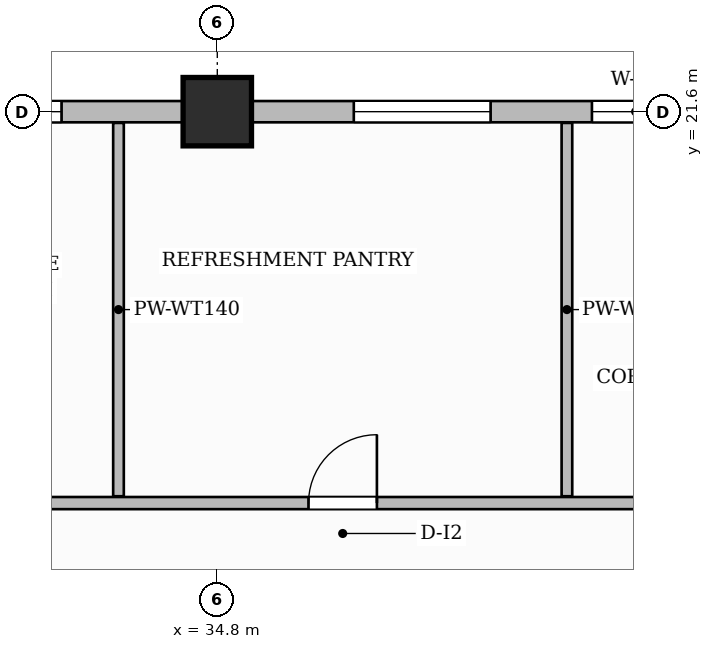
"""IFC4 building model, lengths in metres.
Left out: names, types, materials, properties, quantities, classifications, styles, units other than length and angle.
Written with IfcOpenShell. Run it as: python <this file> out.ifc"""

import sys

from ifc_helpers import new_model, si_unit, direction, frame, frame_2d, origin, origin_2d, place, context, subcontext, project, spatial, rectangle, extrude, source, transform, mapped, element, fill, save


model = new_model("IFC4")
c1 = context("Model", 3, precision=1e-05, world=origin(), true_north=direction((0.0, 1.0)))
c2 = subcontext(c1, "Body", "Model", "MODEL_VIEW")
j1 = project(units=[si_unit("LENGTHUNIT", "METRE"), si_unit("PLANEANGLEUNIT", "RADIAN")], contexts=[c1])
p1 = place(None, origin())
s1 = spatial("IfcSite", under=j1, at=p1, CompositionType="ELEMENT")
p2 = place(p1, origin())
s2 = spatial("IfcBuilding", under=s1, at=p2, CompositionType="ELEMENT")
p3 = place(p2, frame((0.0, 0.0, 213.45)))
s3 = spatial("IfcBuildingStorey", under=s2, at=p3, CompositionType="ELEMENT", Elevation=213.45)
m1 = source(origin(), c2, "Body", "SweptSolid", [
    extrude(rectangle(XDim=0.9, YDim=0.9, at=origin_2d()), origin(), (0.0, 0.0, 1.0), 3.85),
])
p4 = place(p3, frame((34.8, 21.6, 0.0), z_axis=(0.0, 0.0, 1.0), x_axis=(1.0, 0.0, 0.0)))
e1 = element("IfcColumn", 1, at=p4, inside=s3, PredefinedType="COLUMN", context=c2, shape_type="MappedRepresentation", body=[
    mapped(m1, transform((0.0, 0.0, 0.0), scale=1.0)),
])
p5 = place(p3, frame((30.29, 16.45, 0.0), z_axis=(0.0, 0.0, 1.0), x_axis=(1.0, 0.0, 0.0)))
e2 = element("IfcWall", 2, at=p5, inside=s3, PredefinedType="PARTITIONING", context=c2, shape_type="SweptSolid", body=[
    extrude(rectangle(XDim=19.37, YDim=0.16, at=frame_2d((9.685, 0.0))), origin(), (0.0, 0.0, 1.0), 3.6),
])
p6 = place(p5, frame((1.135, 0.0, 0.0)))
e3 = element("IfcOpeningElement", 3, at=p6, cuts=e2, PredefinedType="OPENING", context=c2, shape_type="SweptSolid", body=[
    extrude(rectangle(XDim=0.85, YDim=2.1, at=frame_2d((0.425, 1.05))), frame((0.0, 0.09, 0.0), z_axis=(0.0, -1.0, 0.0), x_axis=(1.0, 0.0, 0.0)), (0.0, 0.0, 1.0), 0.18),
])
p7 = place(p5, frame((5.71, 0.0, 0.0)))
e4 = element("IfcOpeningElement", 4, at=p7, cuts=e2, PredefinedType="OPENING", context=c2, shape_type="SweptSolid", body=[
    extrude(rectangle(XDim=0.9, YDim=2.15, at=frame_2d((0.45, 1.075))), frame((0.0, 0.09, 0.0), z_axis=(0.0, -1.0, 0.0), x_axis=(1.0, 0.0, 0.0)), (0.0, 0.0, 1.0), 0.18),
])
p8 = place(p5, frame((10.635, 0.0, 0.0)))
e5 = element("IfcOpeningElement", 5, at=p8, cuts=e2, PredefinedType="OPENING", context=c2, shape_type="SweptSolid", body=[
    extrude(rectangle(XDim=0.95, YDim=2.15, at=frame_2d((0.475, 1.075))), frame((0.0, 0.09, 0.0), z_axis=(0.0, -1.0, 0.0), x_axis=(1.0, 0.0, 0.0)), (0.0, 0.0, 1.0), 0.18),
])
p9 = place(p5, frame((16.235, 0.0, 0.0)))
e6 = element("IfcOpeningElement", 6, at=p9, cuts=e2, PredefinedType="OPENING", context=c2, shape_type="SweptSolid", body=[
    extrude(rectangle(XDim=0.95, YDim=2.15, at=frame_2d((0.475, 1.075))), frame((0.0, 0.09, 0.0), z_axis=(0.0, -1.0, 0.0), x_axis=(1.0, 0.0, 0.0)), (0.0, 0.0, 1.0), 0.18),
])
for number, where, z_axis, x_axis in (
    (7, (33.5, 16.54, 0.0), (0.0, 0.0, 1.0), (0.0, 1.0, 0.0)),
    (8, (39.4, 16.54, 0.0), (0.0, 0.0, 1.0), (0.0, 1.0, 0.0)),
):
    element("IfcWall", number, at=place(p3, frame(where, z_axis=z_axis, x_axis=x_axis)), inside=s3, PredefinedType="PARTITIONING", context=c2, shape_type="SweptSolid", body=[
        extrude(rectangle(XDim=4.912, YDim=0.14, at=frame_2d((2.456, 0.0))), origin(), (0.0, 0.0, 1.0), 3.6),
    ])
p10 = place(p3, frame((14.4, 21.6, 0.0), z_axis=(0.0, 0.0, 1.0), x_axis=(1.0, 0.0, 0.0)))
e9 = element("IfcWall", 9, at=p10, inside=s3, PredefinedType="SOLIDWALL", context=c2, shape_type="SweptSolid", body=[
    extrude(rectangle(XDim=35.4, YDim=0.28, at=frame_2d((17.7, 0.0))), origin(), (0.0, 0.0, 1.0), 3.135),
])
p11 = place(p10, frame((1.196, 0.0, 0.8)))
e10 = element("IfcOpeningElement", 10, at=p11, cuts=e9, PredefinedType="OPENING", context=c2, shape_type="SweptSolid", body=[
    extrude(rectangle(XDim=1.15, YDim=1.8, at=frame_2d((0.575, 0.9))), frame((0.0, 0.15, 0.0), z_axis=(0.0, -1.0, 0.0), x_axis=(1.0, 0.0, 0.0)), (0.0, 0.0, 1.0), 0.3),
])
p12 = place(p10, frame((3.679, 0.0, 0.8)))
e11 = element("IfcOpeningElement", 11, at=p12, cuts=e9, PredefinedType="OPENING", context=c2, shape_type="SweptSolid", body=[
    extrude(rectangle(XDim=1.8, YDim=1.85, at=frame_2d((0.9, 0.925))), frame((0.0, 0.15, 0.0), z_axis=(0.0, -1.0, 0.0), x_axis=(1.0, 0.0, 0.0)), (0.0, 0.0, 1.0), 0.3),
])
p13 = place(p10, frame((8.181, 0.0, 0.8)))
e12 = element("IfcOpeningElement", 12, at=p13, cuts=e9, PredefinedType="OPENING", context=c2, shape_type="SweptSolid", body=[
    extrude(rectangle(XDim=0.95, YDim=1.75, at=frame_2d((0.475, 0.875))), frame((0.0, 0.15, 0.0), z_axis=(0.0, -1.0, 0.0), x_axis=(1.0, 0.0, 0.0)), (0.0, 0.0, 1.0), 0.3),
])
p14 = place(p10, frame((10.564, 0.0, 0.8)))
e13 = element("IfcOpeningElement", 13, at=p14, cuts=e9, PredefinedType="OPENING", context=c2, shape_type="SweptSolid", body=[
    extrude(rectangle(XDim=1.8, YDim=1.85, at=frame_2d((0.9, 0.925))), frame((0.0, 0.15, 0.0), z_axis=(0.0, -1.0, 0.0), x_axis=(1.0, 0.0, 0.0)), (0.0, 0.0, 1.0), 0.3),
])
p15 = place(p10, frame((16.551, 0.0, 0.8)))
e14 = element("IfcOpeningElement", 14, at=p15, cuts=e9, PredefinedType="OPENING", context=c2, shape_type="SweptSolid", body=[
    extrude(rectangle(XDim=1.8, YDim=1.85, at=frame_2d((0.9, 0.925))), frame((0.0, 0.15, 0.0), z_axis=(0.0, -1.0, 0.0), x_axis=(1.0, 0.0, 0.0)), (0.0, 0.0, 1.0), 0.3),
])
p16 = place(p10, frame((22.196, 0.0, 0.8)))
e15 = element("IfcOpeningElement", 15, at=p16, cuts=e9, PredefinedType="OPENING", context=c2, shape_type="SweptSolid", body=[
    extrude(rectangle(XDim=1.8, YDim=1.85, at=frame_2d((0.9, 0.925))), frame((0.0, 0.15, 0.0), z_axis=(0.0, -1.0, 0.0), x_axis=(1.0, 0.0, 0.0)), (0.0, 0.0, 1.0), 0.3),
])
p17 = place(p10, frame((25.329, 0.0, 0.8)))
e16 = element("IfcOpeningElement", 16, at=p17, cuts=e9, PredefinedType="OPENING", context=c2, shape_type="SweptSolid", body=[
    extrude(rectangle(XDim=1.15, YDim=1.8, at=frame_2d((0.575, 0.9))), frame((0.0, 0.15, 0.0), z_axis=(0.0, -1.0, 0.0), x_axis=(1.0, 0.0, 0.0)), (0.0, 0.0, 1.0), 0.3),
])
p18 = place(p10, frame((28.721, 0.0, 0.8)))
e17 = element("IfcOpeningElement", 17, at=p18, cuts=e9, PredefinedType="OPENING", context=c2, shape_type="SweptSolid", body=[
    extrude(rectangle(XDim=0.95, YDim=1.75, at=frame_2d((0.475, 0.875))), frame((0.0, 0.15, 0.0), z_axis=(0.0, -1.0, 0.0), x_axis=(1.0, 0.0, 0.0)), (0.0, 0.0, 1.0), 0.3),
])
p19 = place(p10, frame((31.404, 0.0, 0.8)))
e18 = element("IfcOpeningElement", 18, at=p19, cuts=e9, PredefinedType="OPENING", context=c2, shape_type="SweptSolid", body=[
    extrude(rectangle(XDim=1.8, YDim=1.85, at=frame_2d((0.9, 0.925))), frame((0.0, 0.15, 0.0), z_axis=(0.0, -1.0, 0.0), x_axis=(1.0, 0.0, 0.0)), (0.0, 0.0, 1.0), 0.3),
])
m2 = source(origin(), c2, "Body", "SweptSolid", [
    extrude(rectangle(XDim=0.9, YDim=2.15, at=frame_2d((0.45, 1.075))), frame((0.0, 0.025, 0.0), z_axis=(0.0, -1.0, 0.0), x_axis=(1.0, 0.0, 0.0)), (0.0, 0.0, 1.0), 0.05),
])
p20 = place(p7, origin())
e19 = element("IfcDoor", 19, at=p20, inside=s3, OperationType="SINGLE_SWING_RIGHT", PredefinedType="DOOR", context=c2, shape_type="MappedRepresentation", body=[
    mapped(m2, transform((0.0, 0.0, 0.0), scale=1.0)),
])
fill(e4, e19)
m3 = source(origin(), c2, "Body", "SweptSolid", [
    extrude(rectangle(XDim=1.8, YDim=1.85, at=frame_2d((0.9, 0.925))), frame((0.0, 0.03, 0.0), z_axis=(0.0, -1.0, 0.0), x_axis=(1.0, 0.0, 0.0)), (0.0, 0.0, 1.0), 0.06),
])
p21 = place(p15, origin())
e20 = element("IfcWindow", 20, at=p21, inside=s3, PartitioningType="DOUBLE_PANEL_VERTICAL", PredefinedType="WINDOW", context=c2, shape_type="MappedRepresentation", body=[
    mapped(m3, transform((0.0, 0.0, 0.0), scale=1.0)),
])
fill(e14, e20)
p22 = place(p16, origin())
e21 = element("IfcWindow", 21, at=p22, inside=s3, PartitioningType="DOUBLE_PANEL_VERTICAL", PredefinedType="WINDOW", context=c2, shape_type="MappedRepresentation", body=[
    mapped(m3, transform((0.0, 0.0, 0.0), scale=1.0)),
])
fill(e15, e21)
m4 = source(origin(), c2, "Body", "SweptSolid", [
    extrude(rectangle(XDim=1.15, YDim=1.8, at=frame_2d((0.575, 0.9))), frame((0.0, 0.03, 0.0), z_axis=(0.0, -1.0, 0.0), x_axis=(1.0, 0.0, 0.0)), (0.0, 0.0, 1.0), 0.06),
])
p23 = place(p17, origin())
e22 = element("IfcWindow", 22, at=p23, inside=s3, PartitioningType="SINGLE_PANEL", PredefinedType="WINDOW", context=c2, shape_type="MappedRepresentation", body=[
    mapped(m4, transform((0.0, 0.0, 0.0), scale=1.0)),
])
fill(e16, e22)
save(model, sys.argv[1])
